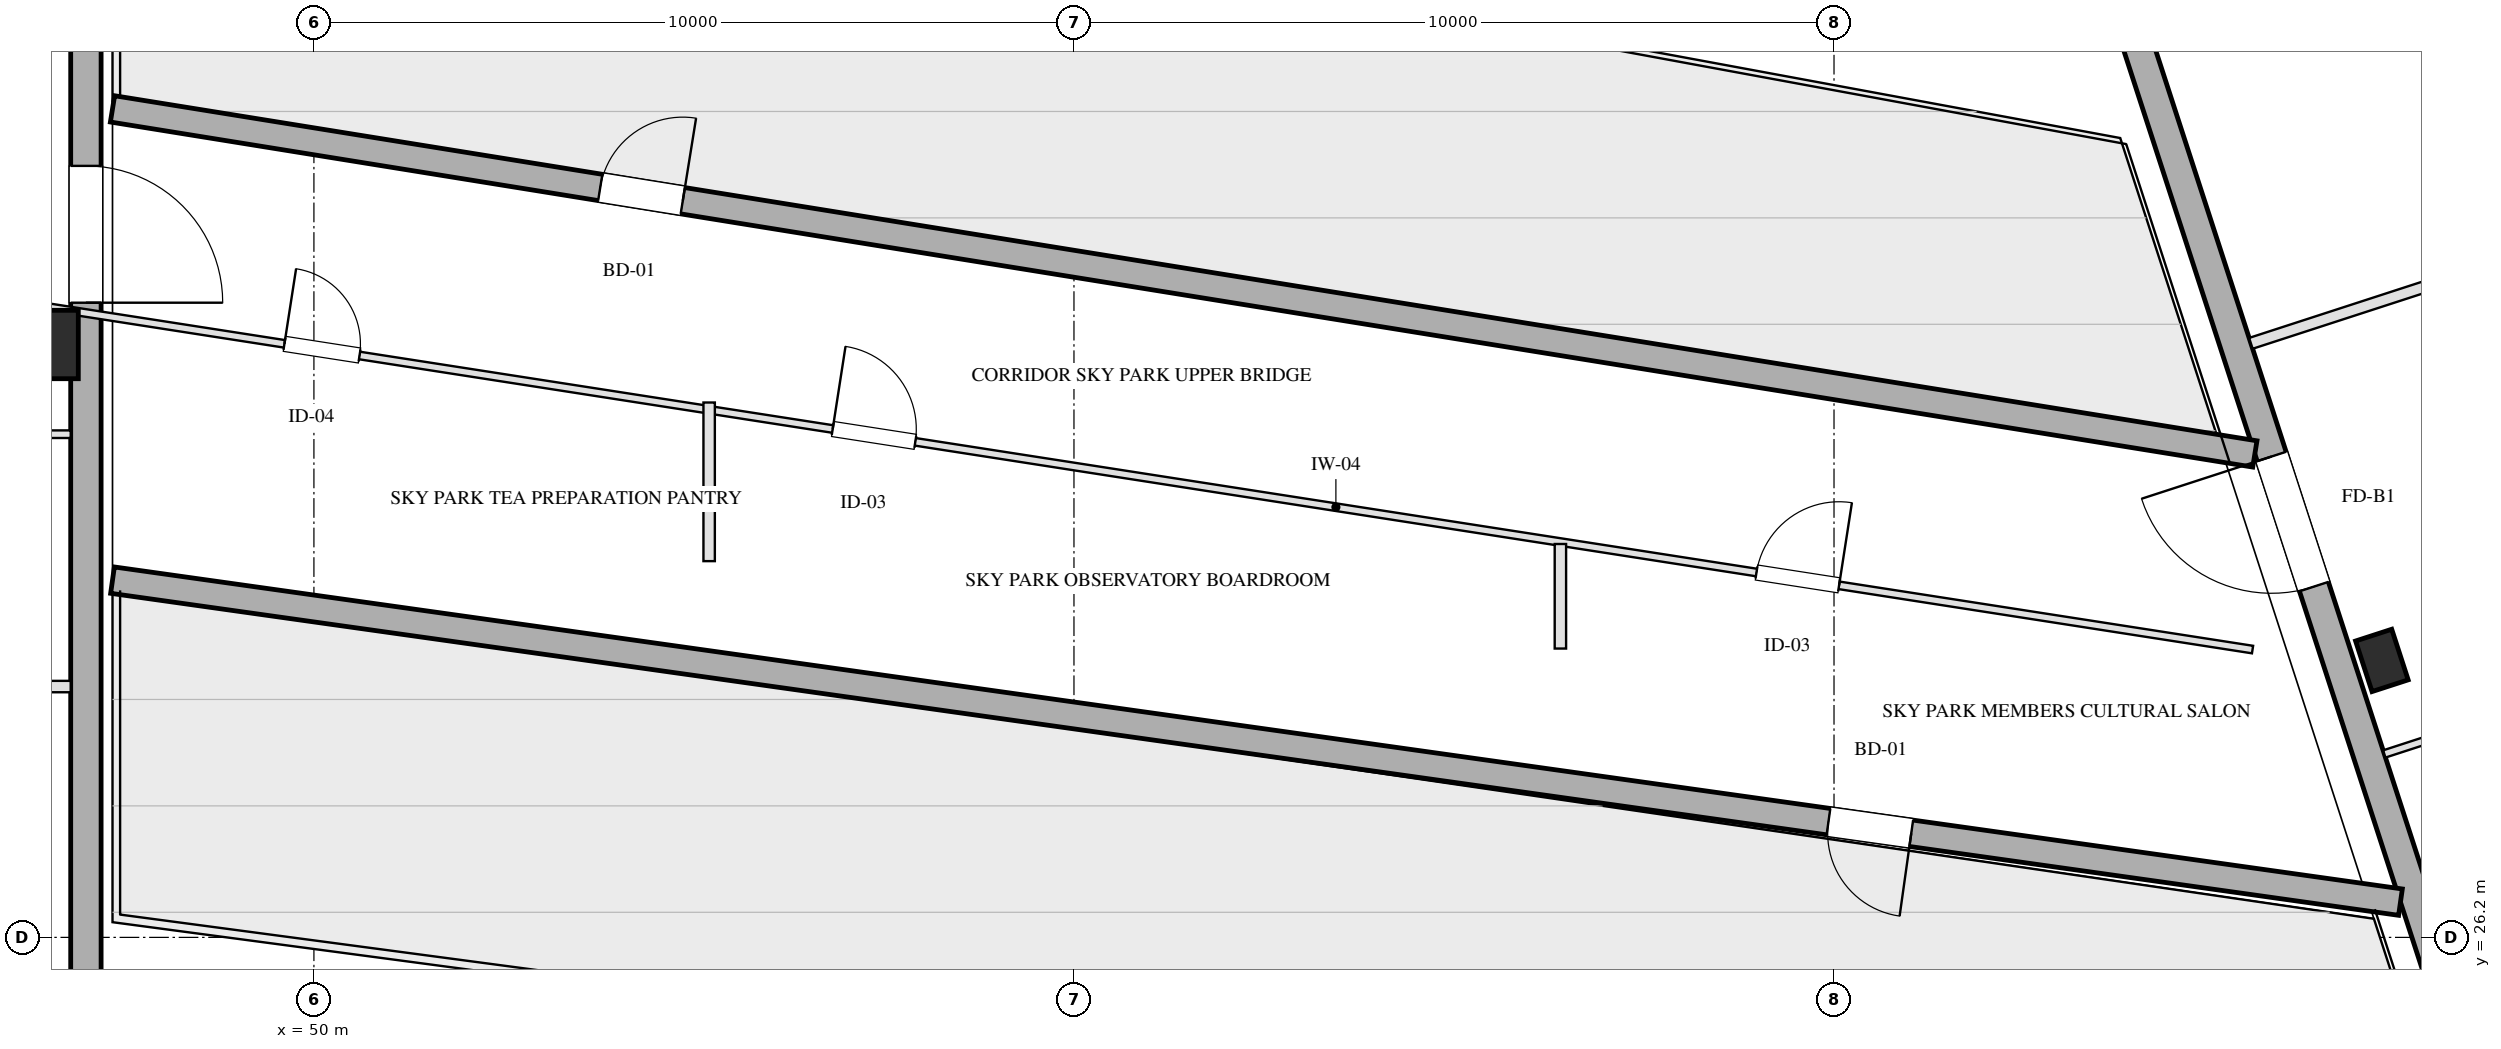
"""IFC4 building model, lengths in metres.
Left out: names, types, materials, properties, quantities, classifications, styles, units other than length and angle.
Written with IfcOpenShell. Run it as: python <this file> out.ifc"""

import sys

from ifc_helpers import new_model, si_unit, direction, frame, frame_2d, origin, origin_2d, place, context, subcontext, project, spatial, rectangle, hollow_rectangle, extrude, element, fill, save


model = new_model("IFC4")
c1 = context("Model", 3, precision=1e-05, world=origin(), true_north=direction((0.0, 1.0)))
c2 = subcontext(c1, "Body", "Model", "MODEL_VIEW")
j1 = project(units=[si_unit("LENGTHUNIT", "METRE"), si_unit("PLANEANGLEUNIT", "RADIAN")], contexts=[c1])
p1 = place(None, origin())
s1 = spatial("IfcSite", under=j1, at=p1, CompositionType="ELEMENT")
p2 = place(p1, origin())
s2 = spatial("IfcBuilding", under=s1, at=p2, CompositionType="ELEMENT")
p3 = place(p2, frame((0.0, 0.0, 219.65)))
s3 = spatial("IfcBuildingStorey", under=s2, at=p3, CompositionType="ELEMENT", Elevation=219.65)
p4 = place(p3, frame((46.45, 34.0, 0.0), z_axis=(0.0, 0.0, 1.0), x_axis=(1.0, 0.0, 0.0)))
e1 = element("IfcColumn", 1, at=p4, inside=s3, PredefinedType="COLUMN", context=c2, shape_type="SweptSolid", body=[
    extrude(hollow_rectangle(XDim=0.9, YDim=0.9, WallThickness=0.032, at=origin_2d()), origin(), (0.0, 0.0, 1.0), 3.451),
])
p5 = place(p3, frame((77.208, 29.844, 0.0), z_axis=(0.0, 0.0, 1.0), x_axis=(0.951056516295, 0.309016994375, 0.0)))
e2 = element("IfcColumn", 2, at=p5, inside=s3, PredefinedType="COLUMN", context=c2, shape_type="SweptSolid", body=[
    extrude(hollow_rectangle(XDim=0.5, YDim=0.7, WallThickness=0.025, at=origin_2d()), origin(), (0.0, 0.0, 1.0), 3.451),
])
p6 = place(p3, frame((47.0, 57.2, 0.0), z_axis=(0.0, 0.0, 1.0), x_axis=(0.0, -1.0, 0.0)))
e3 = element("IfcWall", 3, at=p6, inside=s3, PredefinedType="SOLIDWALL", context=c2, shape_type="SweptSolid", body=[
    extrude(rectangle(XDim=46.4, YDim=0.4, at=frame_2d((23.2, 0.0))), origin(), (0.0, 0.0, 1.0), 2.61),
])
p7 = place(p6, frame((20.85, 0.0, 0.0)))
e4 = element("IfcOpeningElement", 4, at=p7, cuts=e3, PredefinedType="OPENING", context=c2, shape_type="SweptSolid", body=[
    extrude(rectangle(XDim=1.8, YDim=2.2, at=frame_2d((0.9, 1.1))), frame((0.0, 0.21, 0.0), z_axis=(0.0, -1.0, 0.0), x_axis=(1.0, 0.0, 0.0)), (0.0, 0.0, 1.0), 0.42),
])
p8 = place(p3, frame((82.618, 11.414, 0.0), z_axis=(0.0, 0.0, 1.0), x_axis=(-0.309016491071, 0.951056679828, 0.0)))
e5 = element("IfcWall", 5, at=p8, inside=s3, PredefinedType="SOLIDWALL", context=c2, shape_type="SweptSolid", body=[
    extrude(rectangle(XDim=38.4, YDim=0.4, at=frame_2d((19.2, 0.0))), origin(), (0.0, 0.0, 1.0), 2.61),
])
p9 = place(p8, frame((20.4, 0.0, 0.0)))
e6 = element("IfcOpeningElement", 6, at=p9, cuts=e5, PredefinedType="OPENING", context=c2, shape_type="SweptSolid", body=[
    extrude(rectangle(XDim=1.8, YDim=2.2, at=frame_2d((0.9, 1.1))), frame((0.0, 0.21, 0.0), z_axis=(0.0, -1.0, 0.0), x_axis=(1.0, 0.0, 0.0)), (0.0, 0.0, 1.0), 0.42),
])
p10 = place(p3, frame((77.453, 26.664, 0.0), z_axis=(0.0, 0.0, 1.0), x_axis=(-0.990242401523, 0.13935561067, 0.0)))
e7 = element("IfcWall", 7, at=p10, inside=s3, PredefinedType="SOLIDWALL", context=c2, shape_type="SweptSolid", body=[
    extrude(rectangle(XDim=30.399, YDim=0.35, at=frame_2d((15.2, 0.0))), origin(), (0.0, 0.0, 1.0), 3.4),
])
p11 = place(p10, frame((6.5, 0.0, 0.0)))
e8 = element("IfcOpeningElement", 8, at=p11, cuts=e7, PredefinedType="OPENING", context=c2, shape_type="SweptSolid", body=[
    extrude(rectangle(XDim=1.1, YDim=2.15, at=frame_2d((0.55, 1.075))), frame((0.0, 0.185, 0.0), z_axis=(0.0, -1.0, 0.0), x_axis=(1.0, 0.0, 0.0)), (0.0, 0.0, 1.0), 0.37),
])
p12 = place(p3, frame((47.35, 37.1, 0.0), z_axis=(0.0, 0.0, 1.0), x_axis=(0.98727687058, -0.159010631147, 0.0)))
e9 = element("IfcWall", 9, at=p12, inside=s3, PredefinedType="SOLIDWALL", context=c2, shape_type="SweptSolid", body=[
    extrude(rectangle(XDim=28.55, YDim=0.35, at=frame_2d((14.275, 0.0))), origin(), (0.0, 0.0, 1.0), 3.4),
])
p13 = place(p12, frame((6.5, 0.0, 0.0)))
e10 = element("IfcOpeningElement", 10, at=p13, cuts=e9, PredefinedType="OPENING", context=c2, shape_type="SweptSolid", body=[
    extrude(rectangle(XDim=1.1, YDim=2.15, at=frame_2d((0.55, 1.075))), frame((0.0, 0.185, 0.0), z_axis=(0.0, -1.0, 0.0), x_axis=(1.0, 0.0, 0.0)), (0.0, 0.0, 1.0), 0.37),
])
p14 = place(p3, frame((28.425, 29.5, 0.0), z_axis=(0.0, 0.0, 1.0), x_axis=(1.0, 0.0, 0.0)))
e11 = element("IfcWall", 11, at=p14, inside=s3, PredefinedType="PARTITIONING", context=c2, shape_type="SweptSolid", body=[
    extrude(rectangle(XDim=18.375, YDim=0.15, at=frame_2d((9.188, 0.0))), origin(), (0.0, 0.0, 1.0), 3.175),
])
p15 = place(p14, frame((10.725, 0.0, 0.0)))
e12 = element("IfcOpeningElement", 12, at=p15, cuts=e11, PredefinedType="OPENING", context=c2, shape_type="SweptSolid", body=[
    extrude(rectangle(XDim=0.85, YDim=2.05, at=frame_2d((0.425, 1.025))), frame((0.0, 0.085, 0.0), z_axis=(0.0, -1.0, 0.0), x_axis=(1.0, 0.0, 0.0)), (0.0, 0.0, 1.0), 0.17),
])
p16 = place(p3, frame((28.425, 32.82, 0.0), z_axis=(0.0, 0.0, 1.0), x_axis=(1.0, 0.0, 0.0)))
e13 = element("IfcWall", 13, at=p16, inside=s3, PredefinedType="MOVABLE", context=c2, shape_type="SweptSolid", body=[
    extrude(rectangle(XDim=18.375, YDim=0.1, at=frame_2d((9.188, 0.0))), origin(), (0.0, 0.0, 1.0), 3.175),
])
p17 = place(p3, frame((75.485, 34.015, 0.0), z_axis=(0.0, 0.0, 1.0), x_axis=(0.951055402118, 0.30902042344, 0.0)))
e14 = element("IfcWall", 14, at=p17, inside=s3, PredefinedType="PARTITIONING", context=c2, shape_type="SweptSolid", body=[
    extrude(rectangle(XDim=10.175, YDim=0.15, at=frame_2d((5.087, 0.0))), origin(), (0.0, 0.0, 1.0), 3.175),
])
p18 = place(p3, frame((77.24, 28.613, 0.0), z_axis=(0.0, 0.0, 1.0), x_axis=(0.951055402118, 0.30902042344, 0.0)))
e15 = element("IfcWall", 15, at=p18, inside=s3, PredefinedType="MOVABLE", context=c2, shape_type="SweptSolid", body=[
    extrude(rectangle(XDim=10.175, YDim=0.1, at=frame_2d((5.087, 0.0))), origin(), (0.0, 0.0, 1.0), 3.175),
])
p19 = place(p3, frame((46.45, 34.5, 0.0), z_axis=(0.0, 0.0, 1.0), x_axis=(0.988149988354, -0.153491369519, 0.0)))
e16 = element("IfcWall", 16, at=p19, inside=s3, PredefinedType="MOVABLE", context=c2, shape_type="SweptSolid", body=[
    extrude(rectangle(XDim=29.405, YDim=0.1, at=frame_2d((14.703, 0.0))), origin(), (0.0, 0.0, 1.0), 3.175),
])
p20 = place(p19, frame((3.2, 0.0, 0.0)))
e17 = element("IfcOpeningElement", 17, at=p20, cuts=e16, PredefinedType="OPENING", context=c2, shape_type="SweptSolid", body=[
    extrude(rectangle(XDim=1.0, YDim=2.05, at=frame_2d((0.5, 1.025))), frame((0.0, 0.06, 0.0), z_axis=(0.0, -1.0, 0.0), x_axis=(1.0, 0.0, 0.0)), (0.0, 0.0, 1.0), 0.12),
])
p21 = place(p19, frame((10.5, 0.0, 0.0)))
e18 = element("IfcOpeningElement", 18, at=p21, cuts=e16, PredefinedType="OPENING", context=c2, shape_type="SweptSolid", body=[
    extrude(rectangle(XDim=1.1, YDim=2.05, at=frame_2d((0.55, 1.025))), frame((0.0, 0.06, 0.0), z_axis=(0.0, -1.0, 0.0), x_axis=(1.0, 0.0, 0.0)), (0.0, 0.0, 1.0), 0.12),
])
p22 = place(p19, frame((22.8, 0.0, 0.0)))
e19 = element("IfcOpeningElement", 19, at=p22, cuts=e16, PredefinedType="OPENING", context=c2, shape_type="SweptSolid", body=[
    extrude(rectangle(XDim=1.1, YDim=2.05, at=frame_2d((0.55, 1.025))), frame((0.0, 0.06, 0.0), z_axis=(0.0, -1.0, 0.0), x_axis=(1.0, 0.0, 0.0)), (0.0, 0.0, 1.0), 0.12),
])
p23 = place(p3, frame((55.2, 31.15, 0.0), z_axis=(0.0, 0.0, 1.0), x_axis=(0.0, 1.0, 0.0)))
e20 = element("IfcWall", 20, at=p23, inside=s3, PredefinedType="PARTITIONING", context=c2, shape_type="SweptSolid", body=[
    extrude(rectangle(XDim=2.087, YDim=0.15, at=frame_2d((1.043, 0.0))), origin(), (0.0, 0.0, 1.0), 3.175),
])
p24 = place(p3, frame((66.4, 30.0, 0.0), z_axis=(0.0, 0.0, 1.0), x_axis=(0.0, 1.0, 0.0)))
e21 = element("IfcWall", 21, at=p24, inside=s3, PredefinedType="PARTITIONING", context=c2, shape_type="SweptSolid", body=[
    extrude(rectangle(XDim=1.375, YDim=0.15, at=frame_2d((0.688, 0.0))), origin(), (0.0, 0.0, 1.0), 3.175),
])
p25 = place(p7, origin())
e22 = element("IfcDoor", 22, at=p25, inside=s3, OperationType="SINGLE_SWING_RIGHT", PredefinedType="DOOR", context=c2, shape_type="SweptSolid", body=[
    extrude(rectangle(XDim=1.8, YDim=2.2, at=frame_2d((0.9, 1.1))), frame((0.0, 0.025, 0.0), z_axis=(0.0, -1.0, 0.0), x_axis=(1.0, 0.0, 0.0)), (0.0, 0.0, 1.0), 0.05),
])
fill(e4, e22)
p26 = place(p9, origin())
e23 = element("IfcDoor", 23, at=p26, inside=s3, OperationType="SINGLE_SWING_RIGHT", PredefinedType="DOOR", context=c2, shape_type="SweptSolid", body=[
    extrude(rectangle(XDim=1.8, YDim=2.2, at=frame_2d((0.9, 1.1))), frame((0.0, 0.025, 0.0), z_axis=(0.0, -1.0, 0.0), x_axis=(1.0, 0.0, 0.0)), (0.0, 0.0, 1.0), 0.05),
])
fill(e6, e23)
p27 = place(p11, origin())
e24 = element("IfcDoor", 24, at=p27, inside=s3, OperationType="SINGLE_SWING_LEFT", PredefinedType="DOOR", context=c2, shape_type="SweptSolid", body=[
    extrude(rectangle(XDim=1.1, YDim=2.15, at=frame_2d((0.55, 1.075))), frame((0.0, 0.025, 0.0), z_axis=(0.0, -1.0, 0.0), x_axis=(1.0, 0.0, 0.0)), (0.0, 0.0, 1.0), 0.05),
])
fill(e8, e24)
p28 = place(p13, origin())
e25 = element("IfcDoor", 25, at=p28, inside=s3, OperationType="SINGLE_SWING_RIGHT", PredefinedType="DOOR", context=c2, shape_type="SweptSolid", body=[
    extrude(rectangle(XDim=1.1, YDim=2.15, at=frame_2d((0.55, 1.075))), frame((0.0, 0.025, 0.0), z_axis=(0.0, -1.0, 0.0), x_axis=(1.0, 0.0, 0.0)), (0.0, 0.0, 1.0), 0.05),
])
fill(e10, e25)
p29 = place(p20, origin())
e26 = element("IfcDoor", 26, at=p29, inside=s3, OperationType="SINGLE_SWING_LEFT", PredefinedType="DOOR", context=c2, shape_type="SweptSolid", body=[
    extrude(rectangle(XDim=1.0, YDim=2.05, at=frame_2d((0.5, 1.025))), frame((0.0, 0.025, 0.0), z_axis=(0.0, -1.0, 0.0), x_axis=(1.0, 0.0, 0.0)), (0.0, 0.0, 1.0), 0.05),
])
fill(e17, e26)
p30 = place(p21, origin())
e27 = element("IfcDoor", 27, at=p30, inside=s3, OperationType="SINGLE_SWING_LEFT", PredefinedType="DOOR", context=c2, shape_type="SweptSolid", body=[
    extrude(rectangle(XDim=1.1, YDim=2.05, at=frame_2d((0.55, 1.025))), frame((0.0, 0.025, 0.0), z_axis=(0.0, -1.0, 0.0), x_axis=(1.0, 0.0, 0.0)), (0.0, 0.0, 1.0), 0.05),
])
fill(e18, e27)
p31 = place(p22, origin())
e28 = element("IfcDoor", 28, at=p31, inside=s3, OperationType="SINGLE_SWING_RIGHT", PredefinedType="DOOR", context=c2, shape_type="SweptSolid", body=[
    extrude(rectangle(XDim=1.1, YDim=2.05, at=frame_2d((0.55, 1.025))), frame((0.0, 0.025, 0.0), z_axis=(0.0, -1.0, 0.0), x_axis=(1.0, 0.0, 0.0)), (0.0, 0.0, 1.0), 0.05),
])
fill(e19, e28)
save(model, sys.argv[1])
